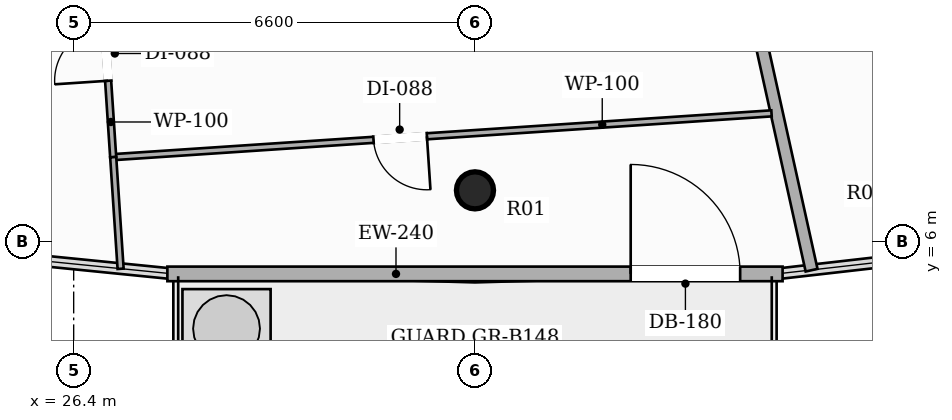
"""IFC4 building model, lengths in metres.
Left out: names, types, materials, properties, quantities, classifications, styles, units other than length and angle.
Written with IfcOpenShell. Run it as: python <this file> out.ifc"""

import sys

from ifc_helpers import new_model, si_unit, direction, frame, frame_2d, origin, origin_2d, place, context, subcontext, project, spatial, rectangle, hollow_circle, extrude, element, fill, save


model = new_model("IFC4")
c1 = context("Model", 3, precision=1e-05, world=origin(), true_north=direction((0.0, 1.0)))
c2 = subcontext(c1, "Body", "Model", "MODEL_VIEW")
j1 = project(units=[si_unit("LENGTHUNIT", "METRE"), si_unit("PLANEANGLEUNIT", "RADIAN")], contexts=[c1])
p1 = place(None, origin())
s1 = spatial("IfcSite", under=j1, at=p1, CompositionType="ELEMENT")
p2 = place(p1, origin())
s2 = spatial("IfcBuilding", under=s1, at=p2, CompositionType="ELEMENT")
p3 = place(p2, frame((0.0, 0.0, 250.25)))
s3 = spatial("IfcBuildingStorey", under=s2, at=p3, CompositionType="ELEMENT", Elevation=250.25)
p4 = place(p3, frame((33.0, 6.844, 0.0), z_axis=(0.0, 0.0, 1.0), x_axis=(1.0, 0.0, 0.0)))
e1 = element("IfcColumn", 1, at=p4, inside=s3, PredefinedType="COLUMN", context=c2, shape_type="SweptSolid", body=[
    extrude(hollow_circle(Radius=0.305, WallThickness=0.016, at=origin_2d()), origin(), (0.0, 0.0, 1.0), 3.3),
])
p5 = place(p3, frame((27.941, 5.47, 0.0), z_axis=(0.0, 0.0, 1.0), x_axis=(1.0, 0.0, 0.0)))
e2 = element("IfcWall", 2, at=p5, inside=s3, PredefinedType="SOLIDWALL", context=c2, shape_type="SweptSolid", body=[
    extrude(rectangle(XDim=10.118, YDim=0.24, at=frame_2d((5.059, 0.0))), origin(), (0.0, 0.0, 1.0), 2.624),
])
p6 = place(p5, frame((7.62, 0.0, 0.0)))
e3 = element("IfcOpeningElement", 3, at=p6, cuts=e2, PredefinedType="OPENING", context=c2, shape_type="SweptSolid", body=[
    extrude(rectangle(XDim=1.8, YDim=2.2, at=frame_2d((0.9, 1.1))), frame((0.0, 0.13, 0.0), z_axis=(0.0, -1.0, 0.0), x_axis=(1.0, 0.0, 0.0)), (0.0, 0.0, 1.0), 0.26),
])
p7 = place(p3, frame((19.575, 6.302, 0.0), z_axis=(0.0, 0.0, 1.0), x_axis=(0.485129783088, 0.874442161358, 0.0)))
e4 = element("IfcWall", 4, at=p7, inside=s3, PredefinedType="PARTITIONING", context=c2, shape_type="SweptSolid", body=[
    extrude(rectangle(XDim=19.999, YDim=0.2, at=frame_2d((10.0, 0.0))), origin(), (0.0, 0.0, 1.0), 2.492),
])
p8 = place(p3, frame((36.21, 16.022, 0.0), z_axis=(0.0, 0.0, 1.0), x_axis=(0.216451711791, -0.976293325012, 0.0)))
e5 = element("IfcWall", 5, at=p8, inside=s3, PredefinedType="PARTITIONING", context=c2, shape_type="SweptSolid", body=[
    extrude(rectangle(XDim=10.746, YDim=0.2, at=frame_2d((5.373, 0.0))), origin(), (0.0, 0.0, 1.0), 2.492),
])
p9 = place(p3, frame((26.338, 23.79, 0.0), z_axis=(0.0, 0.0, 1.0), x_axis=(-0.70454576136, -0.70965855885, 0.0)))
e6 = element("IfcWall", 6, at=p9, inside=s3, PredefinedType="PARTITIONING", context=c2, shape_type="SweptSolid", body=[
    extrude(rectangle(XDim=21.536, YDim=0.2, at=frame_2d((10.768, 0.0))), origin(), (0.0, 0.0, 1.0), 2.492),
])
p10 = place(p3, frame((44.391, 6.058, 0.0), z_axis=(0.0, 0.0, 1.0), x_axis=(-0.422434507673, 0.906393450289, 0.0)))
e7 = element("IfcWall", 7, at=p10, inside=s3, PredefinedType="PARTITIONING", context=c2, shape_type="SweptSolid", body=[
    extrude(rectangle(XDim=19.563, YDim=0.2, at=frame_2d((9.782, 0.0))), origin(), (0.0, 0.0, 1.0), 2.492),
])
p11 = place(p3, frame((37.877, 8.11, 0.0), z_axis=(0.0, 0.0, 1.0), x_axis=(-0.997794804299, -0.066374155471, 0.0)))
e8 = element("IfcWall", 8, at=p11, inside=s3, PredefinedType="PARTITIONING", context=c2, shape_type="SweptSolid", body=[
    extrude(rectangle(XDim=10.851, YDim=0.1, at=frame_2d((5.425, 0.0))), origin(), (0.0, 0.0, 1.0), 2.492),
])
p12 = place(p11, frame((5.68, 0.0, 0.0)))
e9 = element("IfcOpeningElement", 9, at=p12, cuts=e8, PredefinedType="OPENING", context=c2, shape_type="SweptSolid", body=[
    extrude(rectangle(XDim=0.88, YDim=2.1, at=frame_2d((0.44, 1.05))), frame((0.0, 0.06, 0.0), z_axis=(0.0, -1.0, 0.0), x_axis=(1.0, 0.0, 0.0)), (0.0, 0.0, 1.0), 0.12),
])
p13 = place(p3, frame((27.05, 7.39, 0.0), z_axis=(0.0, 0.0, 1.0), x_axis=(-0.066251929929, 0.997802927326, 0.0)))
e10 = element("IfcWall", 10, at=p13, inside=s3, PredefinedType="PARTITIONING", context=c2, shape_type="SweptSolid", body=[
    extrude(rectangle(XDim=3.398, YDim=0.1, at=frame_2d((1.699, 0.0))), origin(), (0.0, 0.0, 1.0), 2.492),
])
p14 = place(p13, frame((1.259, 0.0, 0.0)))
e11 = element("IfcOpeningElement", 11, at=p14, cuts=e10, PredefinedType="OPENING", context=c2, shape_type="SweptSolid", body=[
    extrude(rectangle(XDim=0.88, YDim=2.1, at=frame_2d((0.44, 1.05))), frame((0.0, 0.06, 0.0), z_axis=(0.0, -1.0, 0.0), x_axis=(1.0, 0.0, 0.0)), (0.0, 0.0, 1.0), 0.12),
])
p15 = place(p3, frame((26.825, 10.78, 0.0), z_axis=(0.0, 0.0, 1.0), x_axis=(-0.87825059366, -0.478200684583, 0.0)))
e12 = element("IfcWall", 12, at=p15, inside=s3, PredefinedType="PARTITIONING", context=c2, shape_type="SweptSolid", body=[
    extrude(rectangle(XDim=7.616, YDim=0.12, at=frame_2d((3.808, 0.0))), origin(), (0.0, 0.0, 1.0), 2.492),
])
p16 = place(p3, frame((27.172, 5.554, 0.0), z_axis=(0.0, 0.0, 1.0), x_axis=(-0.066342877953, 0.997796884413, 0.0)))
e13 = element("IfcWall", 13, at=p16, inside=s3, PredefinedType="PARTITIONING", context=c2, shape_type="SweptSolid", body=[
    extrude(rectangle(XDim=1.84, YDim=0.1, at=frame_2d((0.92, 0.0))), origin(), (0.0, 0.0, 1.0), 2.492),
])
p17 = place(p3, frame((42.228, 5.826, 0.0), z_axis=(0.0, 0.0, 1.0), x_axis=(-0.457901041138, 0.889003170143, 0.0)))
e14 = element("IfcWall", 14, at=p17, inside=s3, PredefinedType="PARTITIONING", context=c2, shape_type="SweptSolid", body=[
    extrude(rectangle(XDim=5.894, YDim=0.12, at=frame_2d((2.947, 0.0))), origin(), (0.0, 0.0, 1.0), 2.492),
])
p18 = place(p17, frame((2.507, 0.0, 0.0)))
e15 = element("IfcOpeningElement", 15, at=p18, cuts=e14, PredefinedType="OPENING", context=c2, shape_type="SweptSolid", body=[
    extrude(rectangle(XDim=0.88, YDim=2.1, at=frame_2d((0.44, 1.05))), frame((0.0, 0.07, 0.0), z_axis=(0.0, -1.0, 0.0), x_axis=(1.0, 0.0, 0.0)), (0.0, 0.0, 1.0), 0.14),
])
p19 = place(p6, origin())
e16 = element("IfcDoor", 16, at=p19, inside=s3, OperationType="SINGLE_SWING_LEFT", PredefinedType="DOOR", context=c2, shape_type="SweptSolid", body=[
    extrude(rectangle(XDim=1.8, YDim=2.2, at=frame_2d((0.9, 1.1))), frame((0.0, 0.025, 0.0), z_axis=(0.0, -1.0, 0.0), x_axis=(1.0, 0.0, 0.0)), (0.0, 0.0, 1.0), 0.05),
])
fill(e3, e16)
p20 = place(p12, origin())
e17 = element("IfcDoor", 17, at=p20, inside=s3, OperationType="SINGLE_SWING_LEFT", PredefinedType="DOOR", context=c2, shape_type="SweptSolid", body=[
    extrude(rectangle(XDim=0.88, YDim=2.1, at=frame_2d((0.44, 1.05))), frame((0.0, 0.025, 0.0), z_axis=(0.0, -1.0, 0.0), x_axis=(1.0, 0.0, 0.0)), (0.0, 0.0, 1.0), 0.05),
])
fill(e9, e17)
p21 = place(p14, origin())
e18 = element("IfcDoor", 18, at=p21, inside=s3, OperationType="SINGLE_SWING_LEFT", PredefinedType="DOOR", context=c2, shape_type="SweptSolid", body=[
    extrude(rectangle(XDim=0.88, YDim=2.1, at=frame_2d((0.44, 1.05))), frame((0.0, 0.025, 0.0), z_axis=(0.0, -1.0, 0.0), x_axis=(1.0, 0.0, 0.0)), (0.0, 0.0, 1.0), 0.05),
])
fill(e11, e18)
save(model, sys.argv[1])
